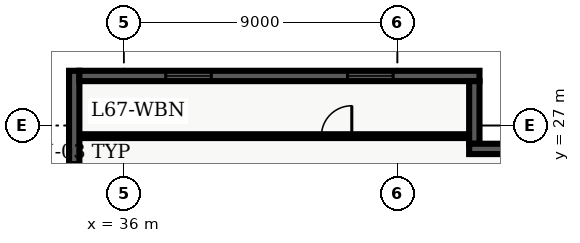
"""IFC4 building model, lengths in metres.
Left out: names, types, materials, properties, quantities, classifications, styles, units other than length and angle.
Written with IfcOpenShell. Run it as: python <this file> out.ifc"""

import sys

from ifc_helpers import new_model, entity, si_unit, converted_unit, direction, frame, origin_with_axes, origin_2d_with_axis, place, context, subcontext, project, spatial, polyline, rectangle, outline, extrude, element, fill, save


model = new_model("IFC4")
c1 = context("Model", 3, precision=1e-05, world=origin_with_axes(), true_north=direction((0.0, 1.0)))
c2 = subcontext(c1, "Body", "Model", "MODEL_VIEW")
j1 = project(units=[si_unit("LENGTHUNIT", "METRE"), converted_unit("PLANEANGLEUNIT", "DEGREE", entity("IfcPlaneAngleMeasure", 0.017), si_unit("PLANEANGLEUNIT", "RADIAN"), dimensions=[0, 0, 0, 0, 0, 0, 0])], contexts=[c1])
p1 = place(None, origin_with_axes())
s1 = spatial("IfcSite", under=j1, at=p1, CompositionType="ELEMENT")
p2 = place(p1, origin_with_axes())
s2 = spatial("IfcBuilding", under=s1, at=p2, CompositionType="ELEMENT")
p3 = place(p2, frame((0.0, 0.0, 272.4), z_axis=(0.0, 0.0, 1.0), x_axis=(1.0, 0.0, 0.0)))
s3 = spatial("IfcBuildingStorey", under=s2, at=p3, CompositionType="ELEMENT", Elevation=272.4)
p4 = place(p3, frame((34.535, 26.65, 0.0), z_axis=(0.0, 0.0, 1.0), x_axis=(1.0, 0.0, 0.0)))
e1 = element("IfcWall", 1, at=p4, inside=s3, PredefinedType="PARTITIONING", context=c2, shape_type="SweptSolid", body=[
    extrude(outline(polyline([(0.0, -0.062), (12.995, -0.062), (12.995, 0.062), (0.0, 0.062), (0.0, -0.062)])), origin_with_axes(), (0.0, 0.0, 1.0), 2.7),
])
p5 = place(p4, frame((8.465, 0.0, 0.0), z_axis=(0.0, 0.0, 1.0), x_axis=(1.0, 0.0, 0.0)))
e2 = element("IfcOpeningElement", 2, at=p5, cuts=e1, PredefinedType="OPENING", context=c2, shape_type="SweptSolid", body=[
    extrude(rectangle(XDim=1.0, YDim=0.145, at=origin_2d_with_axis()), origin_with_axes(), (0.0, 0.0, 1.0), 2.15),
])
p6 = place(p3, frame((34.37, 21.26, 0.0), z_axis=(0.0, 0.0, 1.0), x_axis=(0.0, 1.0, 0.0)))
e3 = element("IfcWall", 3, at=p6, inside=s3, PredefinedType="SOLIDWALL", context=c2, shape_type="SweptSolid", body=[
    extrude(outline(polyline([(0.0, -0.17), (7.54, -0.17), (7.54, 0.17), (0.0, 0.17), (0.0, -0.17)])), origin_with_axes(), (0.0, 0.0, 1.0), 3.66),
])
p7 = place(p6, frame((3.77, 0.0, 0.45), z_axis=(0.0, 0.0, 1.0), x_axis=(1.0, 0.0, 0.0)))
e4 = element("IfcOpeningElement", 4, at=p7, cuts=e3, PredefinedType="OPENING", context=c2, shape_type="SweptSolid", body=[
    extrude(rectangle(XDim=1.5, YDim=0.36, at=origin_2d_with_axis()), origin_with_axes(), (0.0, 0.0, 1.0), 2.1),
])
p8 = place(p3, frame((34.54, 28.63, 0.0), z_axis=(0.0, 0.0, 1.0), x_axis=(1.0, 0.0, 0.0)))
e5 = element("IfcWall", 5, at=p8, inside=s3, PredefinedType="SOLIDWALL", context=c2, shape_type="SweptSolid", body=[
    extrude(outline(polyline([(0.0, -0.17), (13.16, -0.17), (13.16, 0.17), (0.0, 0.17), (0.0, -0.17)])), origin_with_axes(), (0.0, 0.0, 1.0), 3.66),
])
p9 = place(p8, frame((3.59, 0.0, 0.45), z_axis=(0.0, 0.0, 1.0), x_axis=(1.0, 0.0, 0.0)))
e6 = element("IfcOpeningElement", 6, at=p9, cuts=e5, PredefinedType="OPENING", context=c2, shape_type="SweptSolid", body=[
    extrude(rectangle(XDim=1.5, YDim=0.36, at=origin_2d_with_axis()), origin_with_axes(), (0.0, 0.0, 1.0), 2.1),
])
p10 = place(p8, frame((9.57, 0.0, 0.45), z_axis=(0.0, 0.0, 1.0), x_axis=(1.0, 0.0, 0.0)))
e7 = element("IfcOpeningElement", 7, at=p10, cuts=e5, PredefinedType="OPENING", context=c2, shape_type="SweptSolid", body=[
    extrude(rectangle(XDim=1.5, YDim=0.36, at=origin_2d_with_axis()), origin_with_axes(), (0.0, 0.0, 1.0), 2.1),
])
p11 = place(p3, frame((47.53, 28.46, 0.0), z_axis=(0.0, 0.0, 1.0), x_axis=(0.0, -1.0, 0.0)))
e8 = element("IfcWall", 8, at=p11, inside=s3, PredefinedType="SOLIDWALL", context=c2, shape_type="SweptSolid", body=[
    extrude(outline(polyline([(0.0, -0.17), (2.06, -0.17), (2.06, 0.17), (0.0, 0.17), (0.0, -0.17)])), origin_with_axes(), (0.0, 0.0, 1.0), 3.66),
])
p12 = place(p3, frame((47.36, 26.23, 0.0), z_axis=(0.0, 0.0, 1.0), x_axis=(1.0, 0.0, 0.0)))
e9 = element("IfcWall", 9, at=p12, inside=s3, PredefinedType="SOLIDWALL", context=c2, shape_type="SweptSolid", body=[
    extrude(outline(polyline([(0.0, -0.17), (2.74, -0.17), (2.74, 0.17), (0.0, 0.17), (0.0, -0.17)])), origin_with_axes(), (0.0, 0.0, 1.0), 3.66),
])
p13 = place(p4, frame((8.465, 0.0, 0.0), z_axis=(0.0, 0.0, 1.0), x_axis=(1.0, 0.0, 0.0)))
e10 = element("IfcDoor", 10, at=p13, inside=s3, OperationType="SINGLE_SWING_RIGHT", PredefinedType="DOOR", context=c2, shape_type="SweptSolid", body=[
    extrude(rectangle(XDim=1.0, YDim=0.075, at=origin_2d_with_axis()), origin_with_axes(), (0.0, 0.0, 1.0), 2.15),
])
fill(e2, e10)
p14 = place(p8, frame((3.59, 0.0, 0.45), z_axis=(0.0, 0.0, 1.0), x_axis=(1.0, 0.0, 0.0)))
e11 = element("IfcWindow", 11, at=p14, inside=s3, PredefinedType="WINDOW", context=c2, shape_type="SweptSolid", body=[
    extrude(rectangle(XDim=1.5, YDim=0.09, at=origin_2d_with_axis()), origin_with_axes(), (0.0, 0.0, 1.0), 2.1),
])
fill(e6, e11)
p15 = place(p8, frame((9.57, 0.0, 0.45), z_axis=(0.0, 0.0, 1.0), x_axis=(1.0, 0.0, 0.0)))
e12 = element("IfcWindow", 12, at=p15, inside=s3, PredefinedType="WINDOW", context=c2, shape_type="SweptSolid", body=[
    extrude(rectangle(XDim=1.5, YDim=0.09, at=origin_2d_with_axis()), origin_with_axes(), (0.0, 0.0, 1.0), 2.1),
])
fill(e7, e12)
save(model, sys.argv[1])
